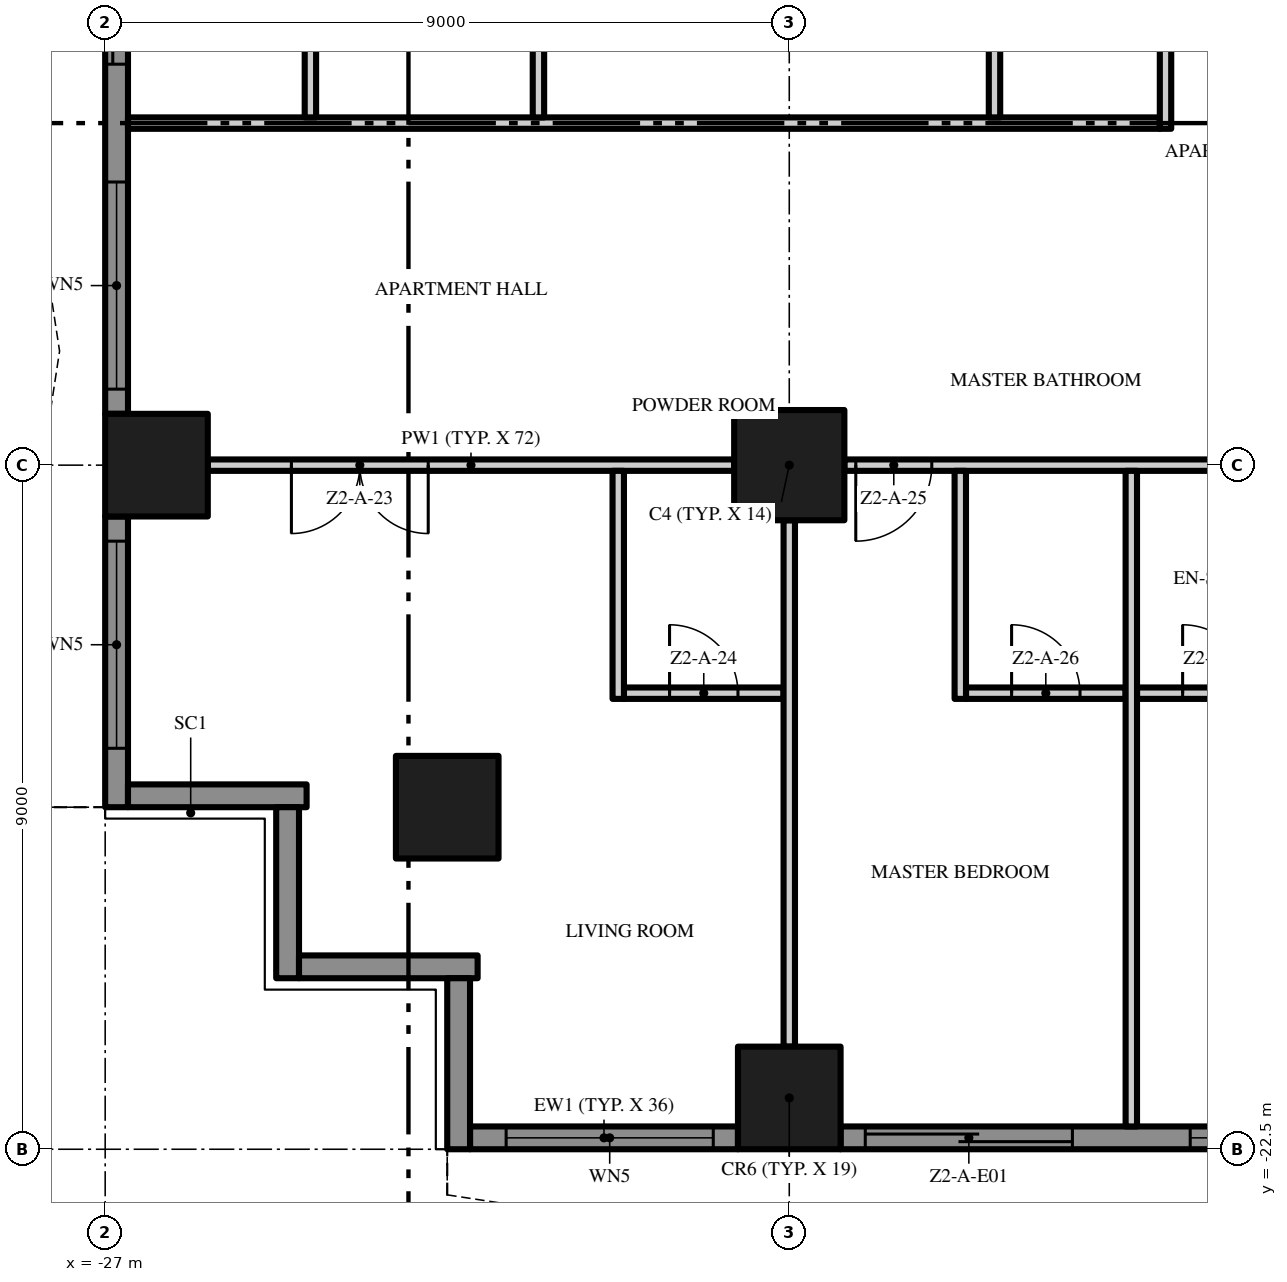
"""IFC4 building model, lengths in metres.
Left out: names, types, materials, properties, quantities, classifications, styles, units other than length and angle.
Written with IfcOpenShell. Run it as: python <this file> out.ifc"""

import sys

from ifc_helpers import new_model, si_unit, direction, frame, frame_2d, origin, origin_2d, place, context, subcontext, project, spatial, polyline, rectangle, outline, extrude, element, fill, save


model = new_model("IFC4")
c1 = context("Model", 3, precision=1e-05, world=origin(), true_north=direction((0.0, 1.0)))
c2 = subcontext(c1, "Body", "Model", "MODEL_VIEW")
j1 = project(units=[si_unit("LENGTHUNIT", "METRE"), si_unit("PLANEANGLEUNIT", "RADIAN")], contexts=[c1])
p1 = place(None, origin())
s1 = spatial("IfcSite", under=j1, at=p1, CompositionType="ELEMENT")
p2 = place(p1, origin())
s2 = spatial("IfcBuilding", under=s1, at=p2, CompositionType="ELEMENT")
p3 = place(p2, frame((0.0, 0.0, 69.4)))
s3 = spatial("IfcBuildingStorey", under=s2, at=p3, CompositionType="ELEMENT", Elevation=69.4)
p4 = place(p3, frame((-18.0, -13.5, 0.0), z_axis=(0.0, 0.0, 1.0), x_axis=(1.0, 0.0, 0.0)))
e1 = element("IfcColumn", 1, at=p4, inside=s3, PredefinedType="COLUMN", context=c2, shape_type="SweptSolid", body=[
    extrude(rectangle(XDim=1.45, YDim=1.45, at=origin_2d()), origin(), (0.0, 0.0, 1.0), 3.5),
])
for number, where, z_axis, x_axis in (
    (2, (-18.0, -21.825, 0.0), (0.0, 0.0, 1.0), (1.0, 0.0, 0.0)),
    (3, (-26.325, -13.5, 0.0), (0.0, 0.0, 1.0), (1.0, 0.0, 0.0)),
    (4, (-22.5, -18.0, 0.0), (0.0, 0.0, 1.0), (1.0, 0.0, 0.0)),
):
    element("IfcColumn", number, at=place(p3, frame(where, z_axis=z_axis, x_axis=x_axis)), inside=s3, PredefinedType="COLUMN", context=c2, shape_type="SweptSolid", body=[
        extrude(rectangle(XDim=1.35, YDim=1.35, at=origin_2d()), origin(), (0.0, 0.0, 1.0), 3.5),
    ])
p5 = place(p3, frame((-18.675, -22.35, 0.0), z_axis=(0.0, 0.0, 1.0), x_axis=(-1.0, 0.0, 0.0)))
e5 = element("IfcWall", 5, at=p5, inside=s3, PredefinedType="SOLIDWALL", context=c2, shape_type="SweptSolid", body=[
    extrude(rectangle(XDim=3.525, YDim=0.3, at=frame_2d((1.762, 0.0))), origin(), (0.0, 0.0, 1.0), 3.5),
])
p6 = place(p5, frame((0.325, 0.0, 0.45)))
e6 = element("IfcOpeningElement", 6, at=p6, cuts=e5, PredefinedType="OPENING", context=c2, shape_type="SweptSolid", body=[
    extrude(rectangle(XDim=2.725, YDim=2.65, at=frame_2d((1.363, 1.325))), frame((0.0, 0.16, 0.0), z_axis=(0.0, -1.0, 0.0), x_axis=(1.0, 0.0, 0.0)), (0.0, 0.0, 1.0), 0.32),
])
p7 = place(p3, frame((-9.675, -22.35, 0.0), z_axis=(0.0, 0.0, 1.0), x_axis=(-1.0, 0.0, 0.0)))
e7 = element("IfcWall", 7, at=p7, inside=s3, PredefinedType="SOLIDWALL", context=c2, shape_type="SweptSolid", body=[
    extrude(rectangle(XDim=7.65, YDim=0.3, at=frame_2d((3.825, 0.0))), origin(), (0.0, 0.0, 1.0), 3.5),
])
p8 = place(p7, frame((4.6, 0.0, 0.0)))
e8 = element("IfcOpeningElement", 8, at=p8, cuts=e7, PredefinedType="OPENING", context=c2, shape_type="SweptSolid", body=[
    extrude(rectangle(XDim=2.725, YDim=2.4, at=frame_2d((1.363, 1.2))), frame((0.0, 0.16, 0.0), z_axis=(0.0, -1.0, 0.0), x_axis=(1.0, 0.0, 0.0)), (0.0, 0.0, 1.0), 0.32),
])
p9 = place(p7, frame((0.325, 0.0, 0.45)))
e9 = element("IfcOpeningElement", 9, at=p9, cuts=e7, PredefinedType="OPENING", context=c2, shape_type="SweptSolid", body=[
    extrude(rectangle(XDim=2.725, YDim=2.65, at=frame_2d((1.363, 1.325))), frame((0.0, 0.16, 0.0), z_axis=(0.0, -1.0, 0.0), x_axis=(1.0, 0.0, 0.0)), (0.0, 0.0, 1.0), 0.32),
])
p10 = place(p3, frame((-26.85, -12.825, 0.0), z_axis=(0.0, 0.0, 1.0), x_axis=(0.0, 1.0, 0.0)))
e10 = element("IfcWall", 10, at=p10, inside=s3, PredefinedType="SOLIDWALL", context=c2, shape_type="SweptSolid", body=[
    extrude(rectangle(XDim=7.65, YDim=0.3, at=frame_2d((3.825, 0.0))), origin(), (0.0, 0.0, 1.0), 3.5),
])
p11 = place(p10, frame((4.6, 0.0, 0.0)))
e11 = element("IfcOpeningElement", 11, at=p11, cuts=e10, PredefinedType="OPENING", context=c2, shape_type="SweptSolid", body=[
    extrude(rectangle(XDim=2.725, YDim=2.4, at=frame_2d((1.363, 1.2))), frame((0.0, 0.16, 0.0), z_axis=(0.0, -1.0, 0.0), x_axis=(1.0, 0.0, 0.0)), (0.0, 0.0, 1.0), 0.32),
])
p12 = place(p10, frame((0.325, 0.0, 0.45)))
e12 = element("IfcOpeningElement", 12, at=p12, cuts=e10, PredefinedType="OPENING", context=c2, shape_type="SweptSolid", body=[
    extrude(rectangle(XDim=2.725, YDim=2.65, at=frame_2d((1.363, 1.325))), frame((0.0, 0.16, 0.0), z_axis=(0.0, -1.0, 0.0), x_axis=(1.0, 0.0, 0.0)), (0.0, 0.0, 1.0), 0.32),
])
p13 = place(p3, frame((-26.85, -18.0, 0.0), z_axis=(0.0, 0.0, 1.0), x_axis=(0.0, 1.0, 0.0)))
e13 = element("IfcWall", 13, at=p13, inside=s3, PredefinedType="SOLIDWALL", context=c2, shape_type="SweptSolid", body=[
    extrude(rectangle(XDim=3.825, YDim=0.3, at=frame_2d((1.913, 0.0))), origin(), (0.0, 0.0, 1.0), 3.5),
])
p14 = place(p13, frame((0.775, 0.0, 0.45)))
e14 = element("IfcOpeningElement", 14, at=p14, cuts=e13, PredefinedType="OPENING", context=c2, shape_type="SweptSolid", body=[
    extrude(rectangle(XDim=2.725, YDim=2.65, at=frame_2d((1.363, 1.325))), frame((0.0, 0.16, 0.0), z_axis=(0.0, -1.0, 0.0), x_axis=(1.0, 0.0, 0.0)), (0.0, 0.0, 1.0), 0.32),
])
p15 = place(p3, frame((-24.35, -17.85, 0.0), z_axis=(0.0, 0.0, 1.0), x_axis=(-1.0, 0.0, 0.0)))
e15 = element("IfcWall", 15, at=p15, inside=s3, PredefinedType="SOLIDWALL", context=c2, shape_type="SweptSolid", body=[
    extrude(rectangle(XDim=2.35, YDim=0.3, at=frame_2d((1.175, 0.0))), origin(), (0.0, 0.0, 1.0), 3.5),
])
p16 = place(p3, frame((-24.6, -20.25, 0.0), z_axis=(0.0, 0.0, 1.0), x_axis=(0.0, 1.0, 0.0)))
e16 = element("IfcWall", 16, at=p16, inside=s3, PredefinedType="SOLIDWALL", context=c2, shape_type="SweptSolid", body=[
    extrude(rectangle(XDim=2.25, YDim=0.3, at=frame_2d((1.125, 0.0))), origin(), (0.0, 0.0, 1.0), 3.5),
])
p17 = place(p3, frame((-22.1, -20.1, 0.0), z_axis=(0.0, 0.0, 1.0), x_axis=(-1.0, 0.0, 0.0)))
e17 = element("IfcWall", 17, at=p17, inside=s3, PredefinedType="SOLIDWALL", context=c2, shape_type="SweptSolid", body=[
    extrude(rectangle(XDim=2.35, YDim=0.3, at=frame_2d((1.175, 0.0))), origin(), (0.0, 0.0, 1.0), 3.5),
])
p18 = place(p3, frame((-22.35, -22.5, 0.0), z_axis=(0.0, 0.0, 1.0), x_axis=(0.0, 1.0, 0.0)))
e18 = element("IfcWall", 18, at=p18, inside=s3, PredefinedType="SOLIDWALL", context=c2, shape_type="SweptSolid", body=[
    extrude(rectangle(XDim=2.25, YDim=0.3, at=frame_2d((1.125, 0.0))), origin(), (0.0, 0.0, 1.0), 3.5),
])
p19 = place(p3, origin())
e19 = element("IfcWall", 19, at=p19, inside=s3, PredefinedType="USERDEFINED", context=c2, shape_type="SweptSolid", body=[
    extrude(outline(polyline([(-22.5, -23.1), (-21.0, -23.329), (-19.5, -23.929), (-18.0, -24.671), (-16.5, -25.271), (-15.0, -25.5), (-13.5, -25.271), (-12.0, -24.671), (-10.5, -23.929), (-9.0, -23.329), (-7.5, -23.1), (-6.0, -23.329), (-4.5, -23.929), (-3.0, -24.671), (-1.5, -25.271), (0.0, -25.5), (1.5, -25.271), (3.0, -24.671), (4.5, -23.929), (6.0, -23.329), (7.5, -23.1), (9.0, -23.329), (10.5, -23.929), (12.0, -24.671), (13.5, -25.271), (15.0, -25.5), (16.5, -25.271), (18.0, -24.671), (19.5, -23.929), (21.0, -23.329), (22.5, -23.1), (22.462, -22.853), (20.934, -23.086), (19.398, -23.701), (17.898, -24.442), (16.434, -25.028), (15.0, -25.247), (13.566, -25.028), (12.102, -24.442), (10.602, -23.701), (9.066, -23.086), (7.5, -22.847), (5.934, -23.086), (4.398, -23.701), (2.898, -24.442), (1.434, -25.028), (0.0, -25.247), (-1.434, -25.028), (-2.898, -24.442), (-4.398, -23.701), (-5.934, -23.086), (-7.5, -22.847), (-9.066, -23.086), (-10.602, -23.701), (-12.102, -24.442), (-13.566, -25.028), (-15.0, -25.247), (-16.434, -25.028), (-17.898, -24.442), (-19.398, -23.701), (-20.934, -23.086), (-22.462, -22.853), (-22.5, -23.1)])), origin(), (0.0, 0.0, 1.0), 0.9),
])
p20 = place(p3, origin())
e20 = element("IfcWall", 20, at=p20, inside=s3, PredefinedType="USERDEFINED", context=c2, shape_type="SweptSolid", body=[
    extrude(outline(polyline([(-27.6, 18.0), (-27.829, 16.5), (-28.429, 15.0), (-29.171, 13.5), (-29.771, 12.0), (-30.0, 10.5), (-29.771, 9.0), (-29.171, 7.5), (-28.429, 6.0), (-27.829, 4.5), (-27.6, 3.0), (-27.829, 1.5), (-28.429, 0.0), (-29.171, -1.5), (-29.771, -3.0), (-30.0, -4.5), (-29.771, -6.0), (-29.171, -7.5), (-28.429, -9.0), (-27.829, -10.5), (-27.6, -12.0), (-27.829, -13.5), (-28.429, -15.0), (-29.171, -16.5), (-29.771, -18.0), (-29.539, -18.093), (-28.942, -16.602), (-28.201, -15.102), (-27.586, -13.566), (-27.347, -12.0), (-27.586, -10.434), (-28.201, -8.898), (-28.942, -7.398), (-29.528, -5.934), (-29.747, -4.5), (-29.528, -3.066), (-28.942, -1.602), (-28.201, -0.102), (-27.586, 1.434), (-27.347, 3.0), (-27.586, 4.566), (-28.201, 6.102), (-28.942, 7.602), (-29.528, 9.066), (-29.747, 10.5), (-29.528, 11.934), (-28.942, 13.398), (-28.201, 14.898), (-27.586, 16.434), (-27.353, 17.962), (-27.6, 18.0)])), origin(), (0.0, 0.0, 1.0), 0.9),
])
p21 = place(p3, frame((-20.175, -16.5, 0.0), z_axis=(0.0, 0.0, 1.0), x_axis=(1.0, 0.0, 0.0)))
e21 = element("IfcWall", 21, at=p21, inside=s3, PredefinedType="PARTITIONING", context=c2, shape_type="SweptSolid", body=[
    extrude(rectangle(XDim=2.1, YDim=0.15, at=frame_2d((1.05, 0.0))), origin(), (0.0, 0.0, 1.0), 3.5),
])
p22 = place(p21, frame((0.6, 0.0, 0.0)))
e22 = element("IfcOpeningElement", 22, at=p22, cuts=e21, PredefinedType="OPENING", context=c2, shape_type="SweptSolid", body=[
    extrude(rectangle(XDim=0.9, YDim=2.1, at=frame_2d((0.45, 1.05))), frame((0.0, 0.085, 0.0), z_axis=(0.0, -1.0, 0.0), x_axis=(1.0, 0.0, 0.0)), (0.0, 0.0, 1.0), 0.17),
])
p23 = place(p3, frame((-15.675, -16.5, 0.0), z_axis=(0.0, 0.0, 1.0), x_axis=(1.0, 0.0, 0.0)))
e23 = element("IfcWall", 23, at=p23, inside=s3, PredefinedType="PARTITIONING", context=c2, shape_type="SweptSolid", body=[
    extrude(rectangle(XDim=2.1, YDim=0.15, at=frame_2d((1.05, 0.0))), origin(), (0.0, 0.0, 1.0), 3.5),
])
p24 = place(p23, frame((0.6, 0.0, 0.0)))
e24 = element("IfcOpeningElement", 24, at=p24, cuts=e23, PredefinedType="OPENING", context=c2, shape_type="SweptSolid", body=[
    extrude(rectangle(XDim=0.9, YDim=2.1, at=frame_2d((0.45, 1.05))), frame((0.0, 0.085, 0.0), z_axis=(0.0, -1.0, 0.0), x_axis=(1.0, 0.0, 0.0)), (0.0, 0.0, 1.0), 0.17),
])
p25 = place(p3, frame((-13.425, -16.5, 0.0), z_axis=(0.0, 0.0, 1.0), x_axis=(1.0, 0.0, 0.0)))
e25 = element("IfcWall", 25, at=p25, inside=s3, PredefinedType="PARTITIONING", context=c2, shape_type="SweptSolid", body=[
    extrude(rectangle(XDim=2.1, YDim=0.15, at=frame_2d((1.05, 0.0))), origin(), (0.0, 0.0, 1.0), 3.5),
])
p26 = place(p25, frame((0.6, 0.0, 0.0)))
e26 = element("IfcOpeningElement", 26, at=p26, cuts=e25, PredefinedType="OPENING", context=c2, shape_type="SweptSolid", body=[
    extrude(rectangle(XDim=0.9, YDim=2.1, at=frame_2d((0.45, 1.05))), frame((0.0, 0.085, 0.0), z_axis=(0.0, -1.0, 0.0), x_axis=(1.0, 0.0, 0.0)), (0.0, 0.0, 1.0), 0.17),
])
p27 = place(p3, frame((-18.725, -13.5, 0.0), z_axis=(0.0, 0.0, 1.0), x_axis=(-1.0, 0.0, 0.0)))
e27 = element("IfcWall", 27, at=p27, inside=s3, PredefinedType="PARTITIONING", context=c2, shape_type="SweptSolid", body=[
    extrude(rectangle(XDim=6.925, YDim=0.15, at=frame_2d((3.462, 0.0))), origin(), (0.0, 0.0, 1.0), 3.5),
])
p28 = place(p27, frame((4.025, 0.0, 0.0)))
e28 = element("IfcOpeningElement", 28, at=p28, cuts=e27, PredefinedType="OPENING", context=c2, shape_type="SweptSolid", body=[
    extrude(rectangle(XDim=1.8, YDim=2.4, at=frame_2d((0.9, 1.2))), frame((0.0, 0.085, 0.0), z_axis=(0.0, -1.0, 0.0), x_axis=(1.0, 0.0, 0.0)), (0.0, 0.0, 1.0), 0.17),
])
p29 = place(p3, frame((-9.725, -13.5, 0.0), z_axis=(0.0, 0.0, 1.0), x_axis=(-1.0, 0.0, 0.0)))
e29 = element("IfcWall", 29, at=p29, inside=s3, PredefinedType="PARTITIONING", context=c2, shape_type="SweptSolid", body=[
    extrude(rectangle(XDim=7.55, YDim=0.15, at=frame_2d((3.775, 0.0))), origin(), (0.0, 0.0, 1.0), 3.5),
])
p30 = place(p29, frame((6.4, 0.0, 0.0)))
e30 = element("IfcOpeningElement", 30, at=p30, cuts=e29, PredefinedType="OPENING", context=c2, shape_type="SweptSolid", body=[
    extrude(rectangle(XDim=1.0, YDim=2.4, at=frame_2d((0.5, 1.2))), frame((0.0, 0.085, 0.0), z_axis=(0.0, -1.0, 0.0), x_axis=(1.0, 0.0, 0.0)), (0.0, 0.0, 1.0), 0.17),
])
p31 = place(p29, frame((0.15, 0.0, 0.0)))
e31 = element("IfcOpeningElement", 31, at=p31, cuts=e29, PredefinedType="OPENING", context=c2, shape_type="SweptSolid", body=[
    extrude(rectangle(XDim=1.0, YDim=2.4, at=frame_2d((0.5, 1.2))), frame((0.0, 0.085, 0.0), z_axis=(0.0, -1.0, 0.0), x_axis=(1.0, 0.0, 0.0)), (0.0, 0.0, 1.0), 0.17),
])
p32 = place(p3, frame((-26.7, -9.0, 0.0), z_axis=(0.0, 0.0, 1.0), x_axis=(1.0, 0.0, 0.0)))
e32 = element("IfcWall", 32, at=p32, inside=s3, PredefinedType="PARTITIONING", context=c2, shape_type="SweptSolid", body=[
    extrude(rectangle(XDim=13.575, YDim=0.15, at=frame_2d((6.787, 0.0))), origin(), (0.0, 0.0, 1.0), 3.5),
])
for number, where, z_axis, x_axis in (
    (33, (-24.3, -8.925, 0.0), (0.0, 0.0, 1.0), (0.0, 1.0, 0.0)),
    (34, (-21.3, -8.925, 0.0), (0.0, 0.0, 1.0), (0.0, 1.0, 0.0)),
):
    element("IfcWall", number, at=place(p3, frame(where, z_axis=z_axis, x_axis=x_axis)), inside=s3, PredefinedType="PARTITIONING", context=c2, shape_type="SweptSolid", body=[
        extrude(rectangle(XDim=4.35, YDim=0.15, at=frame_2d((2.175, 0.0))), origin(), (0.0, 0.0, 1.0), 3.5),
    ])
p33 = place(p3, frame((-20.25, -16.575, 0.0), z_axis=(0.0, 0.0, 1.0), x_axis=(0.0, 1.0, 0.0)))
e35 = element("IfcWall", 35, at=p33, inside=s3, PredefinedType="PARTITIONING", context=c2, shape_type="SweptSolid", body=[
    extrude(rectangle(XDim=3.0, YDim=0.15, at=frame_2d((1.5, 0.0))), origin(), (0.0, 0.0, 1.0), 3.5),
])
p34 = place(p3, frame((-18.0, -21.15, 0.0), z_axis=(0.0, 0.0, 1.0), x_axis=(0.0, 1.0, 0.0)))
e36 = element("IfcWall", 36, at=p34, inside=s3, PredefinedType="PARTITIONING", context=c2, shape_type="SweptSolid", body=[
    extrude(rectangle(XDim=6.925, YDim=0.15, at=frame_2d((3.462, 0.0))), origin(), (0.0, 0.0, 1.0), 3.5),
])
p35 = place(p3, frame((-15.75, -16.575, 0.0), z_axis=(0.0, 0.0, 1.0), x_axis=(0.0, 1.0, 0.0)))
e37 = element("IfcWall", 37, at=p35, inside=s3, PredefinedType="PARTITIONING", context=c2, shape_type="SweptSolid", body=[
    extrude(rectangle(XDim=3.0, YDim=0.15, at=frame_2d((1.5, 0.0))), origin(), (0.0, 0.0, 1.0), 3.5),
])
p36 = place(p3, frame((-15.3, -8.925, 0.0), z_axis=(0.0, 0.0, 1.0), x_axis=(0.0, 1.0, 0.0)))
e38 = element("IfcWall", 38, at=p36, inside=s3, PredefinedType="PARTITIONING", context=c2, shape_type="SweptSolid", body=[
    extrude(rectangle(XDim=4.35, YDim=0.15, at=frame_2d((2.175, 0.0))), origin(), (0.0, 0.0, 1.0), 3.5),
])
p37 = place(p3, frame((-13.5, -22.2, 0.0), z_axis=(0.0, 0.0, 1.0), x_axis=(0.0, 1.0, 0.0)))
e39 = element("IfcWall", 39, at=p37, inside=s3, PredefinedType="PARTITIONING", context=c2, shape_type="SweptSolid", body=[
    extrude(rectangle(XDim=8.625, YDim=0.15, at=frame_2d((4.312, 0.0))), origin(), (0.0, 0.0, 1.0), 3.5),
])
p38 = place(p3, frame((-13.05, -9.075, 0.0), z_axis=(0.0, 0.0, 1.0), x_axis=(0.0, 1.0, 0.0)))
e40 = element("IfcWall", 40, at=p38, inside=s3, PredefinedType="PARTITIONING", context=c2, shape_type="SweptSolid", body=[
    extrude(rectangle(XDim=4.65, YDim=0.15, at=frame_2d((2.325, 0.0))), origin(), (0.0, 0.0, 1.0), 3.5),
])
p39 = place(p38, frame((1.875, 0.0, 0.0)))
e41 = element("IfcOpeningElement", 41, at=p39, cuts=e40, PredefinedType="OPENING", context=c2, shape_type="SweptSolid", body=[
    extrude(rectangle(XDim=0.9, YDim=2.1, at=frame_2d((0.45, 1.05))), frame((0.0, 0.085, 0.0), z_axis=(0.0, -1.0, 0.0), x_axis=(1.0, 0.0, 0.0)), (0.0, 0.0, 1.0), 0.17),
])
p40 = place(p6, origin())
e42 = element("IfcWindow", 42, at=p40, inside=s3, PartitioningType="SINGLE_PANEL", PredefinedType="WINDOW", context=c2, shape_type="SweptSolid", body=[
    extrude(rectangle(XDim=2.725, YDim=2.65, at=frame_2d((1.363, 1.325))), frame((0.0, 0.03, 0.0), z_axis=(0.0, -1.0, 0.0), x_axis=(1.0, 0.0, 0.0)), (0.0, 0.0, 1.0), 0.06),
])
fill(e6, e42)
p41 = place(p8, origin())
e43 = element("IfcDoor", 43, at=p41, inside=s3, OperationType="SINGLE_SWING_LEFT", PredefinedType="DOOR", context=c2, shape_type="SweptSolid", body=[
    extrude(rectangle(XDim=2.725, YDim=2.4, at=frame_2d((1.363, 1.2))), frame((0.0, 0.025, 0.0), z_axis=(0.0, -1.0, 0.0), x_axis=(1.0, 0.0, 0.0)), (0.0, 0.0, 1.0), 0.05),
])
fill(e8, e43)
p42 = place(p9, origin())
e44 = element("IfcWindow", 44, at=p42, inside=s3, PartitioningType="SINGLE_PANEL", PredefinedType="WINDOW", context=c2, shape_type="SweptSolid", body=[
    extrude(rectangle(XDim=2.725, YDim=2.65, at=frame_2d((1.363, 1.325))), frame((0.0, 0.03, 0.0), z_axis=(0.0, -1.0, 0.0), x_axis=(1.0, 0.0, 0.0)), (0.0, 0.0, 1.0), 0.06),
])
fill(e9, e44)
p43 = place(p11, origin())
e45 = element("IfcDoor", 45, at=p43, inside=s3, OperationType="SINGLE_SWING_LEFT", PredefinedType="DOOR", context=c2, shape_type="SweptSolid", body=[
    extrude(rectangle(XDim=2.725, YDim=2.4, at=frame_2d((1.363, 1.2))), frame((0.0, 0.025, 0.0), z_axis=(0.0, -1.0, 0.0), x_axis=(1.0, 0.0, 0.0)), (0.0, 0.0, 1.0), 0.05),
])
fill(e11, e45)
p44 = place(p12, origin())
e46 = element("IfcWindow", 46, at=p44, inside=s3, PartitioningType="SINGLE_PANEL", PredefinedType="WINDOW", context=c2, shape_type="SweptSolid", body=[
    extrude(rectangle(XDim=2.725, YDim=2.65, at=frame_2d((1.363, 1.325))), frame((0.0, 0.03, 0.0), z_axis=(0.0, -1.0, 0.0), x_axis=(1.0, 0.0, 0.0)), (0.0, 0.0, 1.0), 0.06),
])
fill(e12, e46)
p45 = place(p14, origin())
e47 = element("IfcWindow", 47, at=p45, inside=s3, PartitioningType="SINGLE_PANEL", PredefinedType="WINDOW", context=c2, shape_type="SweptSolid", body=[
    extrude(rectangle(XDim=2.725, YDim=2.65, at=frame_2d((1.363, 1.325))), frame((0.0, 0.03, 0.0), z_axis=(0.0, -1.0, 0.0), x_axis=(1.0, 0.0, 0.0)), (0.0, 0.0, 1.0), 0.06),
])
fill(e14, e47)
p46 = place(p28, origin())
e48 = element("IfcDoor", 48, at=p46, inside=s3, OperationType="DOUBLE_DOOR_SINGLE_SWING", PredefinedType="DOOR", context=c2, shape_type="SweptSolid", body=[
    extrude(rectangle(XDim=1.8, YDim=2.4, at=frame_2d((0.9, 1.2))), frame((0.0, 0.025, 0.0), z_axis=(0.0, -1.0, 0.0), x_axis=(1.0, 0.0, 0.0)), (0.0, 0.0, 1.0), 0.05),
])
fill(e28, e48)
p47 = place(p22, origin())
e49 = element("IfcDoor", 49, at=p47, inside=s3, OperationType="SINGLE_SWING_LEFT", PredefinedType="DOOR", context=c2, shape_type="SweptSolid", body=[
    extrude(rectangle(XDim=0.9, YDim=2.1, at=frame_2d((0.45, 1.05))), frame((0.0, 0.025, 0.0), z_axis=(0.0, -1.0, 0.0), x_axis=(1.0, 0.0, 0.0)), (0.0, 0.0, 1.0), 0.05),
])
fill(e22, e49)
p48 = place(p30, origin())
e50 = element("IfcDoor", 50, at=p48, inside=s3, OperationType="SINGLE_SWING_RIGHT", PredefinedType="DOOR", context=c2, shape_type="SweptSolid", body=[
    extrude(rectangle(XDim=1.0, YDim=2.4, at=frame_2d((0.5, 1.2))), frame((0.0, 0.025, 0.0), z_axis=(0.0, -1.0, 0.0), x_axis=(1.0, 0.0, 0.0)), (0.0, 0.0, 1.0), 0.05),
])
fill(e30, e50)
p49 = place(p24, origin())
e51 = element("IfcDoor", 51, at=p49, inside=s3, OperationType="SINGLE_SWING_LEFT", PredefinedType="DOOR", context=c2, shape_type="SweptSolid", body=[
    extrude(rectangle(XDim=0.9, YDim=2.1, at=frame_2d((0.45, 1.05))), frame((0.0, 0.025, 0.0), z_axis=(0.0, -1.0, 0.0), x_axis=(1.0, 0.0, 0.0)), (0.0, 0.0, 1.0), 0.05),
])
fill(e24, e51)
p50 = place(p26, origin())
e52 = element("IfcDoor", 52, at=p50, inside=s3, OperationType="SINGLE_SWING_LEFT", PredefinedType="DOOR", context=c2, shape_type="SweptSolid", body=[
    extrude(rectangle(XDim=0.9, YDim=2.1, at=frame_2d((0.45, 1.05))), frame((0.0, 0.025, 0.0), z_axis=(0.0, -1.0, 0.0), x_axis=(1.0, 0.0, 0.0)), (0.0, 0.0, 1.0), 0.05),
])
fill(e26, e52)
save(model, sys.argv[1])
